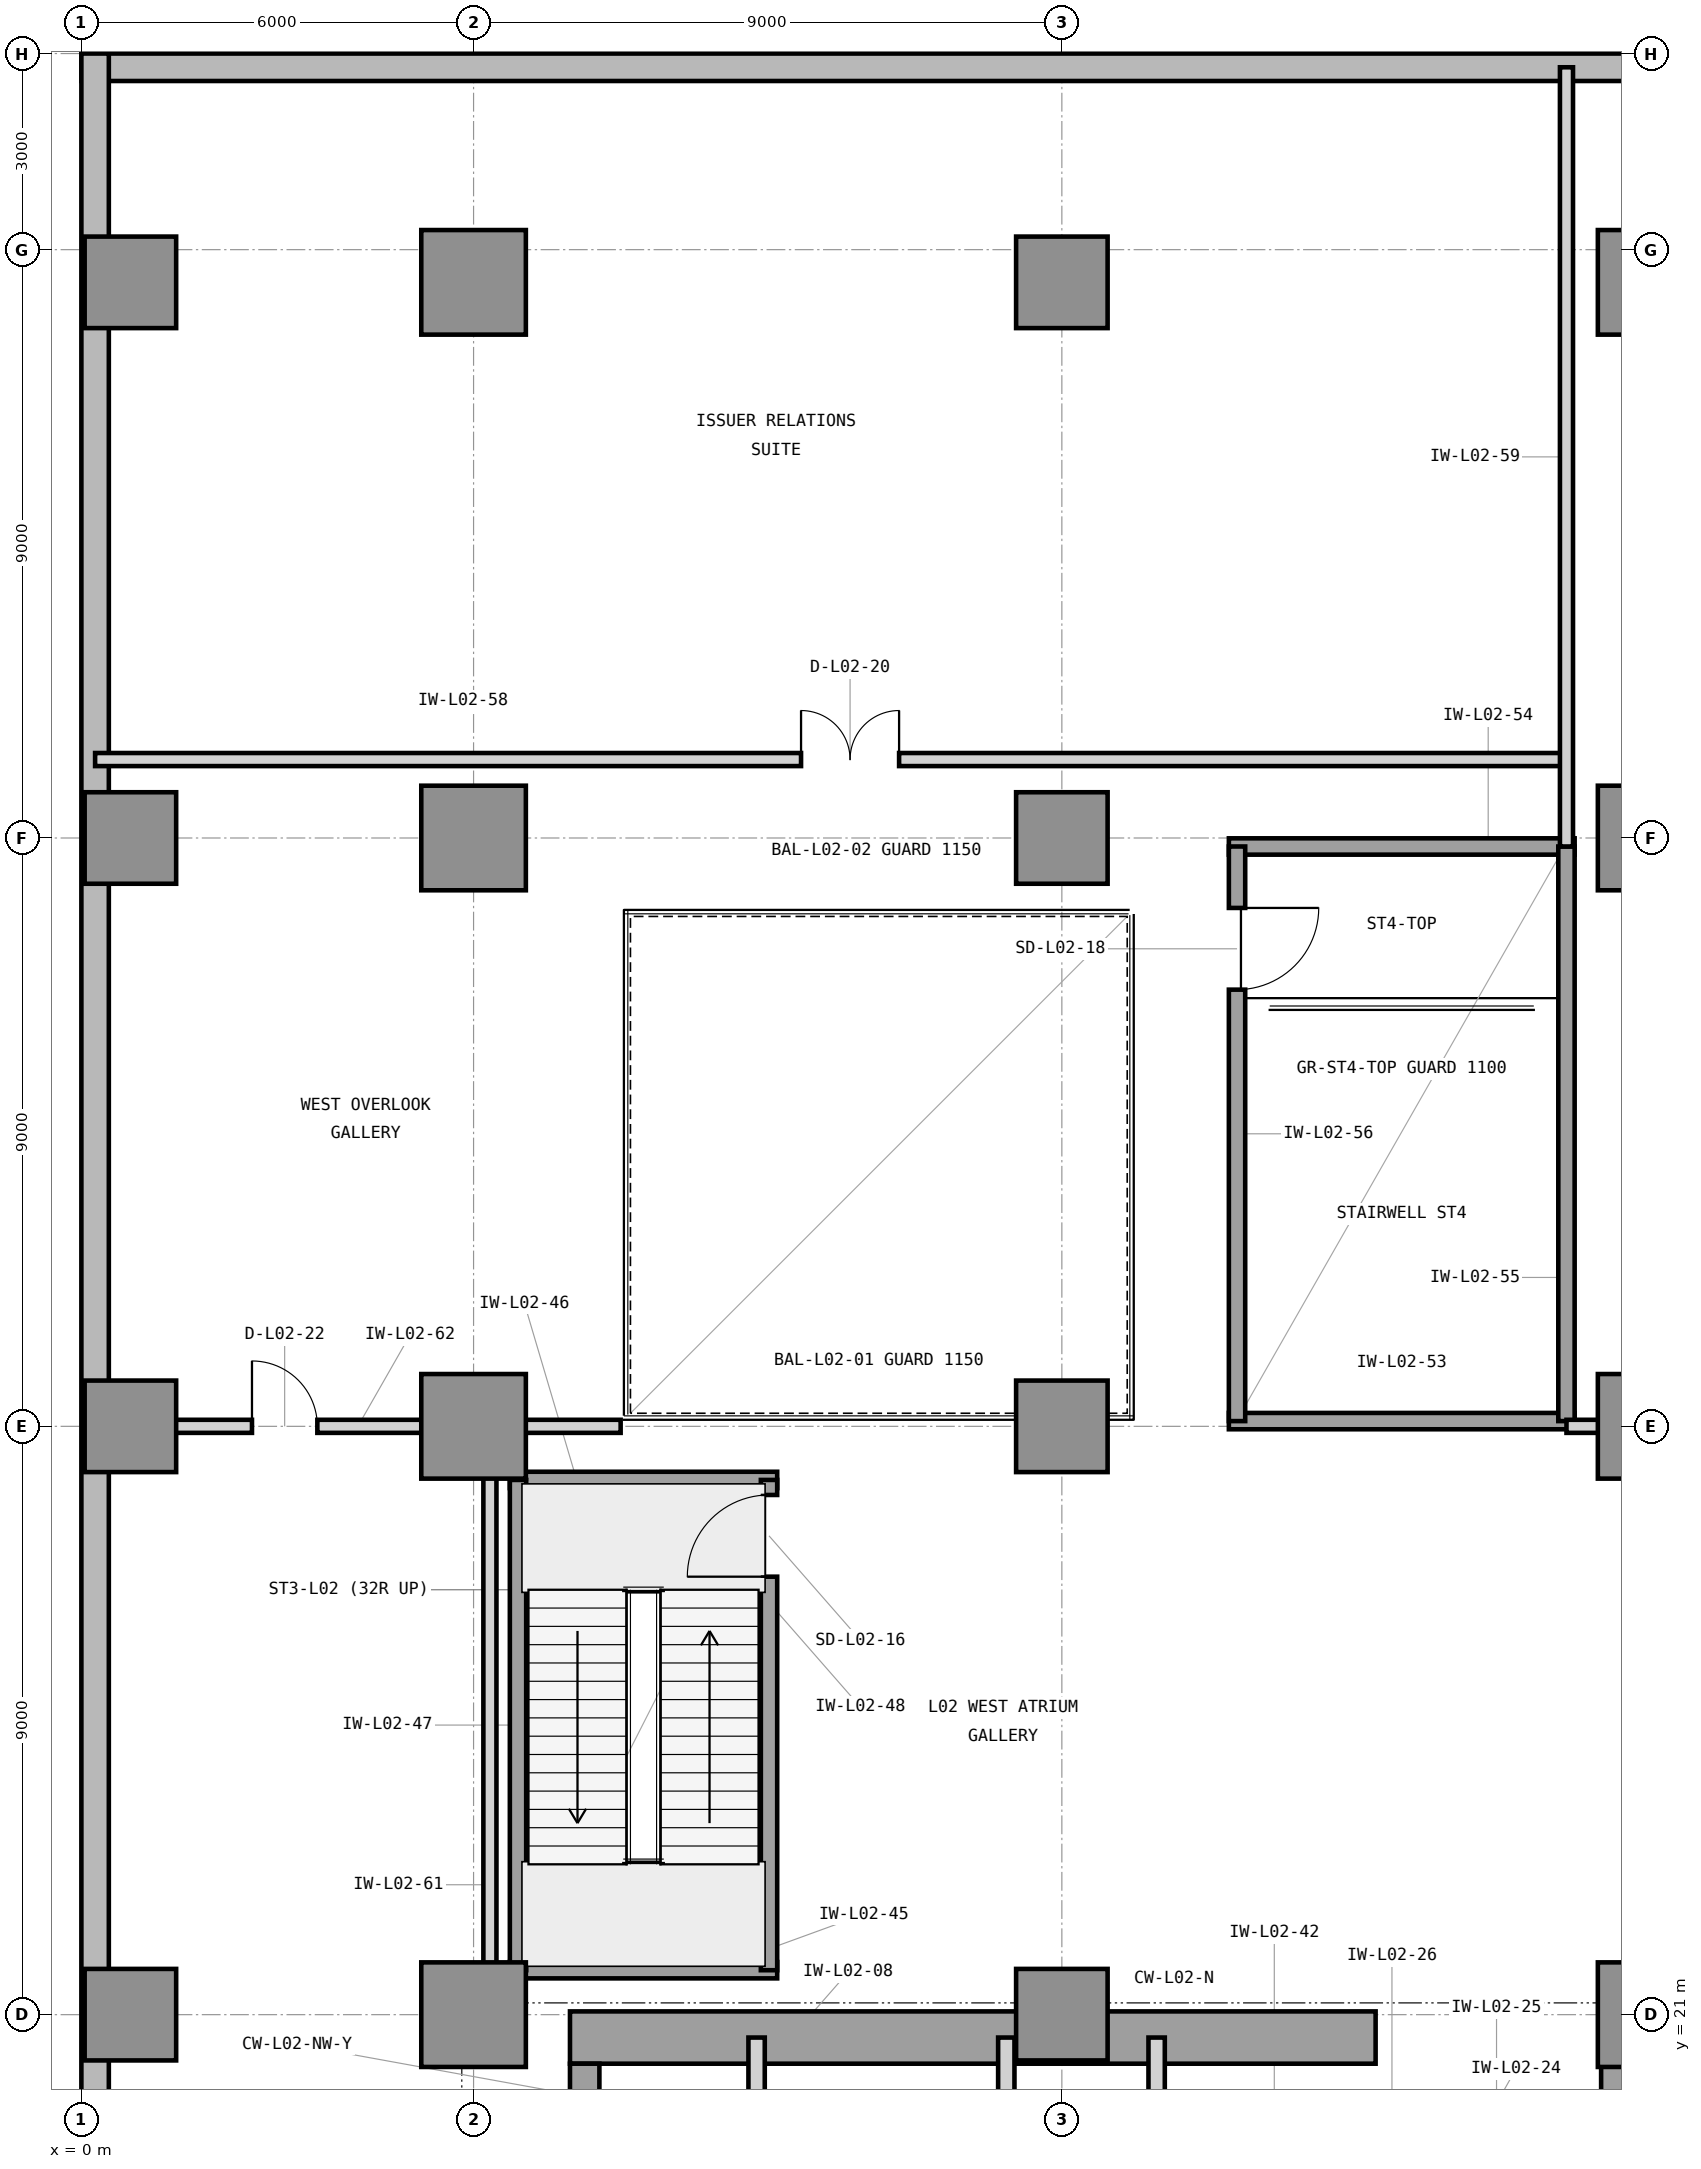
"""IFC4 building model, lengths in metres.
Left out: names, types, materials, properties, quantities, classifications, styles, units other than length and angle.
Written with IfcOpenShell. Run it as: python <this file> out.ifc"""

import sys

from ifc_helpers import new_model, si_unit, direction, frame, frame_2d, origin, origin_2d, place, context, subcontext, project, spatial, rectangle, extrude, element, fill, save


model = new_model("IFC4")
c1 = context("Model", 3, precision=1e-05, world=origin(), true_north=direction((0.0, 1.0)))
c2 = subcontext(c1, "Body", "Model", "MODEL_VIEW")
j1 = project(units=[si_unit("LENGTHUNIT", "METRE"), si_unit("PLANEANGLEUNIT", "RADIAN")], contexts=[c1])
p1 = place(None, origin())
s1 = spatial("IfcSite", under=j1, at=p1, CompositionType="ELEMENT")
p2 = place(p1, origin())
s2 = spatial("IfcBuilding", under=s1, at=p2, CompositionType="ELEMENT")
p3 = place(p2, frame((0.0, 0.0, 10.8)))
s3 = spatial("IfcBuildingStorey", under=s2, at=p3, CompositionType="ELEMENT", Elevation=10.8)
p4 = place(p3, frame((7.475, 20.65, 0.0), z_axis=(0.0, 0.0, 1.0), x_axis=(1.0, 0.0, 0.0)))
e1 = element("IfcWall", 1, at=p4, inside=s3, PredefinedType="SHEAR", context=c2, shape_type="SweptSolid", body=[
    extrude(rectangle(XDim=12.325, YDim=0.8, at=frame_2d((6.163, 0.0))), origin(), (0.0, 0.0, 1.0), 5.4),
])
p5 = place(p3, frame((23.65, 16.6, 0.0), z_axis=(0.0, 0.0, 1.0), x_axis=(0.0, 1.0, 0.0)))
e2 = element("IfcWall", 2, at=p5, inside=s3, PredefinedType="SHEAR", context=c2, shape_type="SweptSolid", body=[
    extrude(rectangle(XDim=4.05, YDim=0.8, at=frame_2d((2.025, 0.0))), origin(), (0.0, 0.0, 1.0), 5.4),
])
p6 = place(p3, frame((7.7, 19.575, 0.0), z_axis=(0.0, 0.0, 1.0), x_axis=(0.0, 1.0, 0.0)))
e3 = element("IfcWall", 3, at=p6, inside=s3, PredefinedType="SHEAR", context=c2, shape_type="SweptSolid", body=[
    extrude(rectangle(XDim=0.675, YDim=0.45, at=frame_2d((0.337, 0.0))), origin(), (0.0, 0.0, 1.0), 5.4),
])
for number, where, z_axis, x_axis in (
    (4, (0.75, 21.0, 0.0), (0.0, 0.0, 1.0), (1.0, 0.0, 0.0)),
    (5, (0.75, 30.0, 0.0), (0.0, 0.0, 1.0), (1.0, 0.0, 0.0)),
    (6, (0.75, 39.0, 0.0), (0.0, 0.0, 1.0), (1.0, 0.0, 0.0)),
    (7, (0.75, 47.5, 0.0), (0.0, 0.0, 1.0), (1.0, 0.0, 0.0)),
):
    element("IfcColumn", number, at=place(p3, frame(where, z_axis=z_axis, x_axis=x_axis)), inside=s3, PredefinedType="COLUMN", context=c2, shape_type="SweptSolid", body=[
        extrude(rectangle(XDim=1.4, YDim=1.4, at=origin_2d()), origin(), (0.0, 0.0, 1.0), 4.8),
    ])
for number, where, z_axis, x_axis in (
    (8, (6.0, 21.0, 0.0), (0.0, 0.0, 1.0), (1.0, 0.0, 0.0)),
    (9, (6.0, 30.0, 0.0), (0.0, 0.0, 1.0), (1.0, 0.0, 0.0)),
    (10, (6.0, 39.0, 0.0), (0.0, 0.0, 1.0), (1.0, 0.0, 0.0)),
    (11, (6.0, 47.5, 0.0), (0.0, 0.0, 1.0), (1.0, 0.0, 0.0)),
):
    element("IfcColumn", number, at=place(p3, frame(where, z_axis=z_axis, x_axis=x_axis)), inside=s3, PredefinedType="COLUMN", context=c2, shape_type="SweptSolid", body=[
        extrude(rectangle(XDim=1.6, YDim=1.6, at=origin_2d()), origin(), (0.0, 0.0, 1.0), 4.8),
    ])
for number, where, z_axis, x_axis in (
    (12, (15.0, 21.0, 0.0), (0.0, 0.0, 1.0), (1.0, 0.0, 0.0)),
    (13, (15.0, 30.0, 0.0), (0.0, 0.0, 1.0), (1.0, 0.0, 0.0)),
    (14, (15.0, 39.0, 0.0), (0.0, 0.0, 1.0), (1.0, 0.0, 0.0)),
    (15, (15.0, 47.5, 0.0), (0.0, 0.0, 1.0), (1.0, 0.0, 0.0)),
):
    element("IfcColumn", number, at=place(p3, frame(where, z_axis=z_axis, x_axis=x_axis)), inside=s3, PredefinedType="COLUMN", context=c2, shape_type="SweptSolid", body=[
        extrude(rectangle(XDim=1.4, YDim=1.4, at=origin_2d()), origin(), (0.0, 0.0, 1.0), 4.8),
    ])
for number, where, z_axis, x_axis in (
    (16, (24.0, 21.0, 0.0), (0.0, 0.0, 1.0), (1.0, 0.0, 0.0)),
    (17, (24.0, 30.0, 0.0), (0.0, 0.0, 1.0), (1.0, 0.0, 0.0)),
    (18, (24.0, 39.0, 0.0), (0.0, 0.0, 1.0), (1.0, 0.0, 0.0)),
    (19, (24.0, 47.5, 0.0), (0.0, 0.0, 1.0), (1.0, 0.0, 0.0)),
):
    element("IfcColumn", number, at=place(p3, frame(where, z_axis=z_axis, x_axis=x_axis)), inside=s3, PredefinedType="COLUMN", context=c2, shape_type="SweptSolid", body=[
        extrude(rectangle(XDim=1.6, YDim=1.6, at=origin_2d()), origin(), (0.0, 0.0, 1.0), 4.8),
    ])
p7 = place(p3, frame((72.0, 50.79, 0.0), z_axis=(0.0, 0.0, 1.0), x_axis=(-1.0, 0.0, 0.0)))
e20 = element("IfcWall", 20, at=p7, inside=s3, PredefinedType="STANDARD", context=c2, shape_type="SweptSolid", body=[
    extrude(rectangle(XDim=72.0, YDim=0.42, at=frame_2d((36.0, 0.0))), origin(), (0.0, 0.0, 1.0), 4.8),
])
p8 = place(p3, frame((0.21, 51.0, 0.0), z_axis=(0.0, 0.0, 1.0), x_axis=(0.0, -1.0, 0.0)))
e21 = element("IfcWall", 21, at=p8, inside=s3, PredefinedType="STANDARD", context=c2, shape_type="SweptSolid", body=[
    extrude(rectangle(XDim=51.0, YDim=0.42, at=frame_2d((25.5, 0.0))), origin(), (0.0, 0.0, 1.0), 4.8),
])
p9 = place(p3, frame((10.33, 19.45, 0.0), z_axis=(0.0, 0.0, 1.0), x_axis=(0.0, 1.0, 0.0)))
e22 = element("IfcWall", 22, at=p9, inside=s3, PredefinedType="PARTITIONING", context=c2, shape_type="SweptSolid", body=[
    extrude(rectangle(XDim=1.2, YDim=0.25, at=frame_2d((0.6, 0.0))), origin(), (0.0, 0.0, 1.0), 3.85),
])
for number, where, z_axis, x_axis in (
    (23, (14.15, 16.7, 0.0), (0.0, 0.0, 1.0), (0.0, 1.0, 0.0)),
    (24, (16.45, 16.7, 0.0), (0.0, 0.0, 1.0), (0.0, 1.0, 0.0)),
):
    element("IfcWall", number, at=place(p3, frame(where, z_axis=z_axis, x_axis=x_axis)), inside=s3, PredefinedType="PARTITIONING", context=c2, shape_type="SweptSolid", body=[
        extrude(rectangle(XDim=3.95, YDim=0.25, at=frame_2d((1.975, 0.0))), origin(), (0.0, 0.0, 1.0), 4.79),
    ])
for number, where, z_axis, x_axis in (
    (25, (6.555, 21.68, 0.0), (0.0, 0.0, 1.0), (1.0, 0.0, 0.0)),
    (26, (6.555, 29.18, 0.0), (0.0, 0.0, 1.0), (1.0, 0.0, 0.0)),
):
    element("IfcWall", number, at=place(p3, frame(where, z_axis=z_axis, x_axis=x_axis)), inside=s3, PredefinedType="SHEAR", context=c2, shape_type="SweptSolid", body=[
        extrude(rectangle(XDim=4.09, YDim=0.25, at=frame_2d((2.045, 0.0))), origin(), (0.0, 0.0, 1.0), 5.4),
    ])
p10 = place(p3, frame((6.68, 21.68, 0.0), z_axis=(0.0, 0.0, 1.0), x_axis=(0.0, 1.0, 0.0)))
e27 = element("IfcWall", 27, at=p10, inside=s3, PredefinedType="SHEAR", context=c2, shape_type="SweptSolid", body=[
    extrude(rectangle(XDim=7.5, YDim=0.25, at=frame_2d((3.75, 0.0))), origin(), (0.0, 0.0, 1.0), 5.4),
])
p11 = place(p3, frame((10.52, 21.68, 0.0), z_axis=(0.0, 0.0, 1.0), x_axis=(0.0, 1.0, 0.0)))
e28 = element("IfcWall", 28, at=p11, inside=s3, PredefinedType="SHEAR", context=c2, shape_type="SweptSolid", body=[
    extrude(rectangle(XDim=7.5, YDim=0.25, at=frame_2d((3.75, 0.0))), origin(), (0.0, 0.0, 1.0), 5.4),
])
p12 = place(p11, frame((6.02, 0.0, 0.0)))
e29 = element("IfcOpeningElement", 29, at=p12, cuts=e28, PredefinedType="OPENING", context=c2, shape_type="SweptSolid", body=[
    extrude(rectangle(XDim=1.25, YDim=2.2, at=frame_2d((0.625, 1.1))), frame((0.0, 0.135, 0.0), z_axis=(0.0, -1.0, 0.0), x_axis=(1.0, 0.0, 0.0)), (0.0, 0.0, 1.0), 0.27),
])
for number, where, z_axis, x_axis in (
    (30, (17.555, 30.08, 0.0), (0.0, 0.0, 1.0), (1.0, 0.0, 0.0)),
    (31, (17.555, 38.87, 0.0), (0.0, 0.0, 1.0), (1.0, 0.0, 0.0)),
):
    element("IfcWall", number, at=place(p3, frame(where, z_axis=z_axis, x_axis=x_axis)), inside=s3, PredefinedType="SHEAR", context=c2, shape_type="SweptSolid", body=[
        extrude(rectangle(XDim=5.29, YDim=0.25, at=frame_2d((2.645, 0.0))), origin(), (0.0, 0.0, 1.0), 5.4),
    ])
p13 = place(p3, frame((22.72, 30.08, 0.0), z_axis=(0.0, 0.0, 1.0), x_axis=(0.0, 1.0, 0.0)))
e32 = element("IfcWall", 32, at=p13, inside=s3, PredefinedType="SHEAR", context=c2, shape_type="SweptSolid", body=[
    extrude(rectangle(XDim=8.79, YDim=0.25, at=frame_2d((4.395, 0.0))), origin(), (0.0, 0.0, 1.0), 5.4),
])
p14 = place(p3, frame((17.68, 30.08, 0.0), z_axis=(0.0, 0.0, 1.0), x_axis=(0.0, 1.0, 0.0)))
e33 = element("IfcWall", 33, at=p14, inside=s3, PredefinedType="SHEAR", context=c2, shape_type="SweptSolid", body=[
    extrude(rectangle(XDim=8.79, YDim=0.25, at=frame_2d((4.395, 0.0))), origin(), (0.0, 0.0, 1.0), 5.4),
])
p15 = place(p14, frame((6.6, 0.0, 0.0)))
e34 = element("IfcOpeningElement", 34, at=p15, cuts=e33, PredefinedType="OPENING", context=c2, shape_type="SweptSolid", body=[
    extrude(rectangle(XDim=1.25, YDim=2.2, at=frame_2d((0.625, 1.1))), frame((0.0, 0.135, 0.0), z_axis=(0.0, -1.0, 0.0), x_axis=(1.0, 0.0, 0.0)), (0.0, 0.0, 1.0), 0.27),
])
p16 = place(p3, frame((22.72, 30.0, 0.0), z_axis=(0.0, 0.0, 1.0), x_axis=(1.0, 0.0, 0.0)))
e35 = element("IfcWall", 35, at=p16, inside=s3, PredefinedType="PARTITIONING", context=c2, shape_type="SweptSolid", body=[
    extrude(rectangle(XDim=10.08, YDim=0.2, at=frame_2d((5.04, 0.0))), origin(), (0.0, 0.0, 1.0), 3.85),
])
p17 = place(p16, frame((3.2, 0.0, 0.0)))
e36 = element("IfcOpeningElement", 36, at=p17, cuts=e35, PredefinedType="OPENING", context=c2, shape_type="SweptSolid", body=[
    extrude(rectangle(XDim=2.0, YDim=2.5, at=frame_2d((1.0, 1.25))), frame((0.0, 0.11, 0.0), z_axis=(0.0, -1.0, 0.0), x_axis=(1.0, 0.0, 0.0)), (0.0, 0.0, 1.0), 0.22),
])
p18 = place(p3, frame((0.21, 40.2, 0.0), z_axis=(0.0, 0.0, 1.0), x_axis=(1.0, 0.0, 0.0)))
e37 = element("IfcWall", 37, at=p18, inside=s3, PredefinedType="PARTITIONING", context=c2, shape_type="SweptSolid", body=[
    extrude(rectangle(XDim=22.51, YDim=0.2, at=frame_2d((11.255, 0.0))), origin(), (0.0, 0.0, 1.0), 4.79),
])
p19 = place(p18, frame((10.8, 0.0, 0.0)))
e38 = element("IfcOpeningElement", 38, at=p19, cuts=e37, PredefinedType="OPENING", context=c2, shape_type="SweptSolid", body=[
    extrude(rectangle(XDim=1.5, YDim=2.3, at=frame_2d((0.75, 1.15))), frame((0.0, 0.11, 0.0), z_axis=(0.0, -1.0, 0.0), x_axis=(1.0, 0.0, 0.0)), (0.0, 0.0, 1.0), 0.22),
])
p20 = place(p3, frame((22.72, 38.87, 0.0), z_axis=(0.0, 0.0, 1.0), x_axis=(0.0, 1.0, 0.0)))
e39 = element("IfcWall", 39, at=p20, inside=s3, PredefinedType="PARTITIONING", context=c2, shape_type="SweptSolid", body=[
    extrude(rectangle(XDim=11.92, YDim=0.2, at=frame_2d((5.96, 0.0))), origin(), (0.0, 0.0, 1.0), 4.79),
])
p21 = place(p3, frame((6.25, 20.65, 0.0), z_axis=(0.0, 0.0, 1.0), x_axis=(0.0, 1.0, 0.0)))
e40 = element("IfcWall", 40, at=p21, inside=s3, PredefinedType="PARTITIONING", context=c2, shape_type="SweptSolid", body=[
    extrude(rectangle(XDim=9.35, YDim=0.2, at=frame_2d((4.675, 0.0))), origin(), (0.0, 0.0, 1.0), 3.19),
])
p22 = place(p3, frame((0.21, 30.0, 0.0), z_axis=(0.0, 0.0, 1.0), x_axis=(1.0, 0.0, 0.0)))
e41 = element("IfcWall", 41, at=p22, inside=s3, PredefinedType="PARTITIONING", context=c2, shape_type="SweptSolid", body=[
    extrude(rectangle(XDim=8.04, YDim=0.2, at=frame_2d((4.02, 0.0))), origin(), (0.0, 0.0, 1.0), 3.85),
])
p23 = place(p22, frame((2.4, 0.0, 0.0)))
e42 = element("IfcOpeningElement", 42, at=p23, cuts=e41, PredefinedType="OPENING", context=c2, shape_type="SweptSolid", body=[
    extrude(rectangle(XDim=1.0, YDim=2.15, at=frame_2d((0.5, 1.075))), frame((0.0, 0.11, 0.0), z_axis=(0.0, -1.0, 0.0), x_axis=(1.0, 0.0, 0.0)), (0.0, 0.0, 1.0), 0.22),
])
p24 = place(p12, origin())
e43 = element("IfcDoor", 43, at=p24, inside=s3, OperationType="SINGLE_SWING_LEFT", PredefinedType="DOOR", context=c2, shape_type="SweptSolid", body=[
    extrude(rectangle(XDim=1.25, YDim=2.2, at=frame_2d((0.625, 1.1))), frame((0.0, 0.025, 0.0), z_axis=(0.0, -1.0, 0.0), x_axis=(1.0, 0.0, 0.0)), (0.0, 0.0, 1.0), 0.05),
])
fill(e29, e43)
p25 = place(p15, frame((1.25, 0.0, 0.0), z_axis=(0.0, 0.0, 1.0), x_axis=(-1.0, 0.0, 0.0)))
e44 = element("IfcDoor", 44, at=p25, inside=s3, OperationType="SINGLE_SWING_LEFT", PredefinedType="DOOR", context=c2, shape_type="SweptSolid", body=[
    extrude(rectangle(XDim=1.25, YDim=2.2, at=frame_2d((0.625, 1.1))), frame((0.0, 0.025, 0.0), z_axis=(0.0, -1.0, 0.0), x_axis=(1.0, 0.0, 0.0)), (0.0, 0.0, 1.0), 0.05),
])
fill(e34, e44)
p26 = place(p19, origin())
e45 = element("IfcDoor", 45, at=p26, inside=s3, OperationType="DOUBLE_DOOR_SINGLE_SWING", PredefinedType="DOOR", context=c2, shape_type="SweptSolid", body=[
    extrude(rectangle(XDim=1.5, YDim=2.3, at=frame_2d((0.75, 1.15))), frame((0.0, 0.025, 0.0), z_axis=(0.0, -1.0, 0.0), x_axis=(1.0, 0.0, 0.0)), (0.0, 0.0, 1.0), 0.05),
])
fill(e38, e45)
p27 = place(p23, origin())
e46 = element("IfcDoor", 46, at=p27, inside=s3, OperationType="SINGLE_SWING_LEFT", PredefinedType="DOOR", context=c2, shape_type="SweptSolid", body=[
    extrude(rectangle(XDim=1.0, YDim=2.15, at=frame_2d((0.5, 1.075))), frame((0.0, 0.025, 0.0), z_axis=(0.0, -1.0, 0.0), x_axis=(1.0, 0.0, 0.0)), (0.0, 0.0, 1.0), 0.05),
])
fill(e42, e46)
save(model, sys.argv[1])
